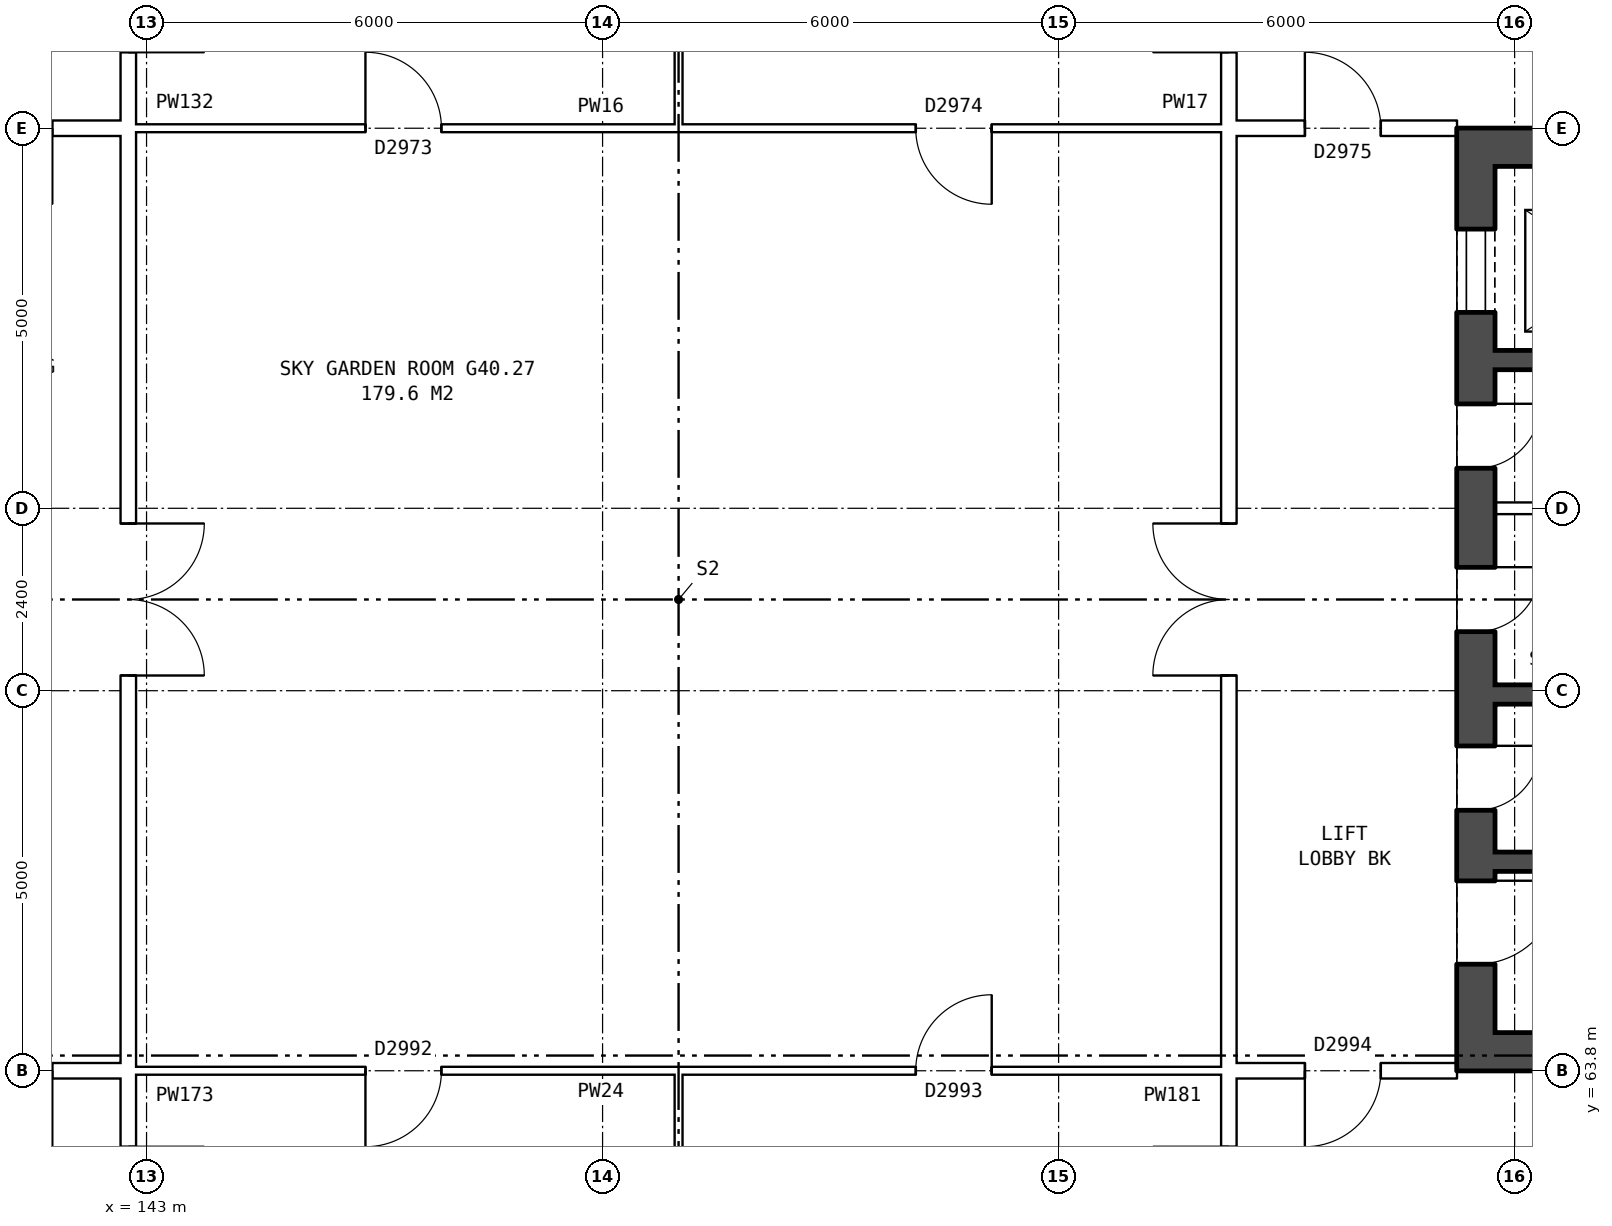
"""IFC4 building model, lengths in metres.
Left out: names, types, materials, properties, quantities, classifications, styles, units other than length and angle.
Written with IfcOpenShell. Run it as: python <this file> out.ifc"""

import sys

from ifc_helpers import new_model, si_unit, direction, frame, frame_2d, origin, place, context, subcontext, project, spatial, rectangle, extrude, element, fill, save


model = new_model("IFC4")
c1 = context("Model", 3, precision=1e-05, world=origin(), true_north=direction((0.0, 1.0)))
c2 = subcontext(c1, "Body", "Model", "MODEL_VIEW")
j1 = project(units=[si_unit("LENGTHUNIT", "METRE"), si_unit("PLANEANGLEUNIT", "RADIAN")], contexts=[c1])
p1 = place(None, origin())
s1 = spatial("IfcSite", under=j1, at=p1, CompositionType="ELEMENT")
p2 = place(p1, origin())
s2 = spatial("IfcBuilding", under=s1, at=p2, CompositionType="ELEMENT")
p3 = place(p2, frame((0.0, 0.0, 142.3)))
s3 = spatial("IfcBuildingStorey", under=s2, at=p3, CompositionType="ELEMENT", Elevation=142.3)
p4 = place(p3, frame((142.76, 63.9, 0.0), z_axis=(0.0, 0.0, 1.0), x_axis=(0.0, 1.0, 0.0)))
e1 = element("IfcWall", 1, at=p4, inside=s3, PredefinedType="PARTITIONING", context=c2, shape_type="SweptSolid", body=[
    extrude(rectangle(XDim=12.2, YDim=0.2, at=frame_2d((6.1, 0.0))), origin(), (0.0, 0.0, 1.0), 5.6),
])
p5 = place(p4, frame((5.1, 0.0, 0.0)))
e2 = element("IfcOpeningElement", 2, at=p5, cuts=e1, PredefinedType="OPENING", context=c2, shape_type="SweptSolid", body=[
    extrude(rectangle(XDim=2.0, YDim=2.1, at=frame_2d((1.0, 1.05))), frame((0.0, 0.11, 0.0), z_axis=(0.0, -1.0, 0.0), x_axis=(1.0, 0.0, 0.0)), (0.0, 0.0, 1.0), 0.22),
])
p6 = place(p3, frame((160.49, 76.2, 0.0), z_axis=(0.0, 0.0, 1.0), x_axis=(0.0, -1.0, 0.0)))
e3 = element("IfcWall", 3, at=p6, inside=s3, PredefinedType="SHEAR", context=c2, shape_type="SweptSolid", body=[
    extrude(rectangle(XDim=12.4, YDim=0.5, at=frame_2d((6.2, 0.0))), origin(), (0.0, 0.0, 1.0), 5.6),
])
p7 = place(p6, frame((1.325, 0.0, 0.0)))
e4 = element("IfcOpeningElement", 4, at=p7, cuts=e3, PredefinedType="OPENING", context=c2, shape_type="SweptSolid", body=[
    extrude(rectangle(XDim=1.1, YDim=2.1, at=frame_2d((0.55, 1.05))), frame((0.0, 0.26, 0.0), z_axis=(0.0, -1.0, 0.0), x_axis=(1.0, 0.0, 0.0)), (0.0, 0.0, 1.0), 0.52),
])
p8 = place(p6, frame((3.625, 0.0, 0.0)))
e5 = element("IfcOpeningElement", 5, at=p8, cuts=e3, PredefinedType="OPENING", context=c2, shape_type="SweptSolid", body=[
    extrude(rectangle(XDim=0.85, YDim=2.1, at=frame_2d((0.425, 1.05))), frame((0.0, 0.26, 0.0), z_axis=(0.0, -1.0, 0.0), x_axis=(1.0, 0.0, 0.0)), (0.0, 0.0, 1.0), 0.52),
])
p9 = place(p6, frame((5.775, 0.0, 0.0)))
e6 = element("IfcOpeningElement", 6, at=p9, cuts=e3, PredefinedType="OPENING", context=c2, shape_type="SweptSolid", body=[
    extrude(rectangle(XDim=0.85, YDim=2.1, at=frame_2d((0.425, 1.05))), frame((0.0, 0.26, 0.0), z_axis=(0.0, -1.0, 0.0), x_axis=(1.0, 0.0, 0.0)), (0.0, 0.0, 1.0), 0.52),
])
p10 = place(p6, frame((9.9, 0.0, 0.0)))
e7 = element("IfcOpeningElement", 7, at=p10, cuts=e3, PredefinedType="OPENING", context=c2, shape_type="SweptSolid", body=[
    extrude(rectangle(XDim=1.1, YDim=2.1, at=frame_2d((0.55, 1.05))), frame((0.0, 0.26, 0.0), z_axis=(0.0, -1.0, 0.0), x_axis=(1.0, 0.0, 0.0)), (0.0, 0.0, 1.0), 0.52),
])
p11 = place(p6, frame((8.125, 0.0, 0.0)))
e8 = element("IfcOpeningElement", 8, at=p11, cuts=e3, PredefinedType="OPENING", context=c2, shape_type="SweptSolid", body=[
    extrude(rectangle(XDim=0.85, YDim=2.1, at=frame_2d((0.425, 1.05))), frame((0.0, 0.26, 0.0), z_axis=(0.0, -1.0, 0.0), x_axis=(1.0, 0.0, 0.0)), (0.0, 0.0, 1.0), 0.52),
])
for number, where, z_axis, x_axis in (
    (9, (160.74, 75.95, 0.0), (0.0, 0.0, 1.0), (1.0, 0.0, 0.0)),
    (10, (160.74, 64.05, 0.0), (0.0, 0.0, 1.0), (1.0, 0.0, 0.0)),
):
    element("IfcWall", number, at=place(p3, frame(where, z_axis=z_axis, x_axis=x_axis)), inside=s3, PredefinedType="SHEAR", context=c2, shape_type="SweptSolid", body=[
        extrude(rectangle(XDim=7.4, YDim=0.5, at=frame_2d((3.7, 0.0))), origin(), (0.0, 0.0, 1.0), 5.6),
    ])
p12 = place(p3, frame((160.74, 73.15, 0.0), z_axis=(0.0, 0.0, 1.0), x_axis=(1.0, 0.0, 0.0)))
e11 = element("IfcWall", 11, at=p12, inside=s3, PredefinedType="SHEAR", context=c2, shape_type="SweptSolid", body=[
    extrude(rectangle(XDim=4.575, YDim=0.25, at=frame_2d((2.288, 0.0))), origin(), (0.0, 0.0, 1.0), 5.6),
])
p13 = place(p3, frame((160.74, 71.2, 0.0), z_axis=(0.0, 0.0, 1.0), x_axis=(1.0, 0.0, 0.0)))
e12 = element("IfcWall", 12, at=p13, inside=s3, PredefinedType="PARTITIONING", context=c2, shape_type="SweptSolid", body=[
    extrude(rectangle(XDim=2.425, YDim=0.15, at=frame_2d((1.212, 0.0))), origin(), (0.0, 0.0, 1.0), 5.6),
])
p14 = place(p3, frame((160.74, 68.75, 0.0), z_axis=(0.0, 0.0, 1.0), x_axis=(1.0, 0.0, 0.0)))
e13 = element("IfcWall", 13, at=p14, inside=s3, PredefinedType="SHEAR", context=c2, shape_type="SweptSolid", body=[
    extrude(rectangle(XDim=7.4, YDim=0.25, at=frame_2d((3.7, 0.0))), origin(), (0.0, 0.0, 1.0), 5.6),
])
p15 = place(p14, frame((4.975, 0.0, 0.0)))
e14 = element("IfcOpeningElement", 14, at=p15, cuts=e13, PredefinedType="OPENING", context=c2, shape_type="SweptSolid", body=[
    extrude(rectangle(XDim=1.1, YDim=2.1, at=frame_2d((0.55, 1.05))), frame((0.0, 0.135, 0.0), z_axis=(0.0, -1.0, 0.0), x_axis=(1.0, 0.0, 0.0)), (0.0, 0.0, 1.0), 0.27),
])
p16 = place(p14, frame((3.2, 0.0, 0.0)))
e15 = element("IfcOpeningElement", 15, at=p16, cuts=e13, PredefinedType="OPENING", context=c2, shape_type="SweptSolid", body=[
    extrude(rectangle(XDim=0.85, YDim=2.1, at=frame_2d((0.425, 1.05))), frame((0.0, 0.135, 0.0), z_axis=(0.0, -1.0, 0.0), x_axis=(1.0, 0.0, 0.0)), (0.0, 0.0, 1.0), 0.27),
])
p17 = place(p3, frame((160.74, 66.55, 0.0), z_axis=(0.0, 0.0, 1.0), x_axis=(1.0, 0.0, 0.0)))
e16 = element("IfcWall", 16, at=p17, inside=s3, PredefinedType="SHEAR", context=c2, shape_type="SweptSolid", body=[
    extrude(rectangle(XDim=2.425, YDim=0.25, at=frame_2d((1.212, 0.0))), origin(), (0.0, 0.0, 1.0), 5.6),
])
p18 = place(p3, frame((157.24, 63.9, 0.0), z_axis=(0.0, 0.0, 1.0), x_axis=(0.0, 1.0, 0.0)))
e17 = element("IfcWall", 17, at=p18, inside=s3, PredefinedType="PARTITIONING", context=c2, shape_type="SweptSolid", body=[
    extrude(rectangle(XDim=12.2, YDim=0.2, at=frame_2d((6.1, 0.0))), origin(), (0.0, 0.0, 1.0), 5.6),
])
p19 = place(p18, frame((5.1, 0.0, 0.0)))
e18 = element("IfcOpeningElement", 18, at=p19, cuts=e17, PredefinedType="OPENING", context=c2, shape_type="SweptSolid", body=[
    extrude(rectangle(XDim=2.0, YDim=2.1, at=frame_2d((1.0, 1.05))), frame((0.0, 0.11, 0.0), z_axis=(0.0, -1.0, 0.0), x_axis=(1.0, 0.0, 0.0)), (0.0, 0.0, 1.0), 0.22),
])
p20 = place(p3, frame((139.76, 63.8, 0.0), z_axis=(0.0, 0.0, 1.0), x_axis=(1.0, 0.0, 0.0)))
e19 = element("IfcWall", 19, at=p20, inside=s3, PredefinedType="PARTITIONING", context=c2, shape_type="SweptSolid", body=[
    extrude(rectangle(XDim=3.1, YDim=0.2, at=frame_2d((1.55, 0.0))), origin(), (0.0, 0.0, 1.0), 5.6),
])
p21 = place(p20, frame((1.0, 0.0, 0.0)))
e20 = element("IfcOpeningElement", 20, at=p21, cuts=e19, PredefinedType="OPENING", context=c2, shape_type="SweptSolid", body=[
    extrude(rectangle(XDim=1.0, YDim=2.1, at=frame_2d((0.5, 1.05))), frame((0.0, 0.11, 0.0), z_axis=(0.0, -1.0, 0.0), x_axis=(1.0, 0.0, 0.0)), (0.0, 0.0, 1.0), 0.22),
])
p22 = place(p3, frame((157.14, 63.8, 0.0), z_axis=(0.0, 0.0, 1.0), x_axis=(1.0, 0.0, 0.0)))
e21 = element("IfcWall", 21, at=p22, inside=s3, PredefinedType="PARTITIONING", context=c2, shape_type="SweptSolid", body=[
    extrude(rectangle(XDim=3.1, YDim=0.2, at=frame_2d((1.55, 0.0))), origin(), (0.0, 0.0, 1.0), 5.6),
])
p23 = place(p22, frame((1.1, 0.0, 0.0)))
e22 = element("IfcOpeningElement", 22, at=p23, cuts=e21, PredefinedType="OPENING", context=c2, shape_type="SweptSolid", body=[
    extrude(rectangle(XDim=1.0, YDim=2.1, at=frame_2d((0.5, 1.05))), frame((0.0, 0.11, 0.0), z_axis=(0.0, -1.0, 0.0), x_axis=(1.0, 0.0, 0.0)), (0.0, 0.0, 1.0), 0.22),
])
p24 = place(p3, frame((142.66, 63.8, 0.0), z_axis=(0.0, 0.0, 1.0), x_axis=(1.0, 0.0, 0.0)))
e23 = element("IfcWall", 23, at=p24, inside=s3, PredefinedType="PARTITIONING", context=c2, shape_type="SweptSolid", body=[
    extrude(rectangle(XDim=14.68, YDim=0.1, at=frame_2d((7.34, 0.0))), origin(), (0.0, 0.0, 1.0), 5.6),
])
p25 = place(p24, frame((3.22, 0.0, 0.0)))
e24 = element("IfcOpeningElement", 24, at=p25, cuts=e23, PredefinedType="OPENING", context=c2, shape_type="SweptSolid", body=[
    extrude(rectangle(XDim=1.0, YDim=2.1, at=frame_2d((0.5, 1.05))), frame((0.0, 0.06, 0.0), z_axis=(0.0, -1.0, 0.0), x_axis=(1.0, 0.0, 0.0)), (0.0, 0.0, 1.0), 0.12),
])
p26 = place(p24, frame((10.46, 0.0, 0.0)))
e25 = element("IfcOpeningElement", 25, at=p26, cuts=e23, PredefinedType="OPENING", context=c2, shape_type="SweptSolid", body=[
    extrude(rectangle(XDim=1.0, YDim=2.1, at=frame_2d((0.5, 1.05))), frame((0.0, 0.06, 0.0), z_axis=(0.0, -1.0, 0.0), x_axis=(1.0, 0.0, 0.0)), (0.0, 0.0, 1.0), 0.12),
])
p27 = place(p3, frame((139.76, 76.2, 0.0), z_axis=(0.0, 0.0, 1.0), x_axis=(1.0, 0.0, 0.0)))
e26 = element("IfcWall", 26, at=p27, inside=s3, PredefinedType="PARTITIONING", context=c2, shape_type="SweptSolid", body=[
    extrude(rectangle(XDim=3.1, YDim=0.2, at=frame_2d((1.55, 0.0))), origin(), (0.0, 0.0, 1.0), 5.6),
])
p28 = place(p27, frame((1.0, 0.0, 0.0)))
e27 = element("IfcOpeningElement", 27, at=p28, cuts=e26, PredefinedType="OPENING", context=c2, shape_type="SweptSolid", body=[
    extrude(rectangle(XDim=1.0, YDim=2.1, at=frame_2d((0.5, 1.05))), frame((0.0, 0.11, 0.0), z_axis=(0.0, -1.0, 0.0), x_axis=(1.0, 0.0, 0.0)), (0.0, 0.0, 1.0), 0.22),
])
p29 = place(p3, frame((157.14, 76.2, 0.0), z_axis=(0.0, 0.0, 1.0), x_axis=(1.0, 0.0, 0.0)))
e28 = element("IfcWall", 28, at=p29, inside=s3, PredefinedType="PARTITIONING", context=c2, shape_type="SweptSolid", body=[
    extrude(rectangle(XDim=3.1, YDim=0.2, at=frame_2d((1.55, 0.0))), origin(), (0.0, 0.0, 1.0), 5.6),
])
p30 = place(p29, frame((1.1, 0.0, 0.0)))
e29 = element("IfcOpeningElement", 29, at=p30, cuts=e28, PredefinedType="OPENING", context=c2, shape_type="SweptSolid", body=[
    extrude(rectangle(XDim=1.0, YDim=2.1, at=frame_2d((0.5, 1.05))), frame((0.0, 0.11, 0.0), z_axis=(0.0, -1.0, 0.0), x_axis=(1.0, 0.0, 0.0)), (0.0, 0.0, 1.0), 0.22),
])
p31 = place(p3, frame((142.66, 76.2, 0.0), z_axis=(0.0, 0.0, 1.0), x_axis=(1.0, 0.0, 0.0)))
e30 = element("IfcWall", 30, at=p31, inside=s3, PredefinedType="PARTITIONING", context=c2, shape_type="SweptSolid", body=[
    extrude(rectangle(XDim=14.68, YDim=0.1, at=frame_2d((7.34, 0.0))), origin(), (0.0, 0.0, 1.0), 5.6),
])
p32 = place(p31, frame((3.22, 0.0, 0.0)))
e31 = element("IfcOpeningElement", 31, at=p32, cuts=e30, PredefinedType="OPENING", context=c2, shape_type="SweptSolid", body=[
    extrude(rectangle(XDim=1.0, YDim=2.1, at=frame_2d((0.5, 1.05))), frame((0.0, 0.06, 0.0), z_axis=(0.0, -1.0, 0.0), x_axis=(1.0, 0.0, 0.0)), (0.0, 0.0, 1.0), 0.12),
])
p33 = place(p31, frame((10.46, 0.0, 0.0)))
e32 = element("IfcOpeningElement", 32, at=p33, cuts=e30, PredefinedType="OPENING", context=c2, shape_type="SweptSolid", body=[
    extrude(rectangle(XDim=1.0, YDim=2.1, at=frame_2d((0.5, 1.05))), frame((0.0, 0.06, 0.0), z_axis=(0.0, -1.0, 0.0), x_axis=(1.0, 0.0, 0.0)), (0.0, 0.0, 1.0), 0.12),
])
p34 = place(p3, frame((142.76, 60.7, 0.0), z_axis=(0.0, 0.0, 1.0), x_axis=(0.0, 1.0, 0.0)))
e33 = element("IfcWall", 33, at=p34, inside=s3, PredefinedType="PARTITIONING", context=c2, shape_type="SweptSolid", body=[
    extrude(rectangle(XDim=3.2, YDim=0.2, at=frame_2d((1.6, 0.0))), origin(), (0.0, 0.0, 1.0), 5.6),
])
p35 = place(p34, frame((1.1, 0.0, 0.0)))
e34 = element("IfcOpeningElement", 34, at=p35, cuts=e33, PredefinedType="OPENING", context=c2, shape_type="SweptSolid", body=[
    extrude(rectangle(XDim=1.0, YDim=2.1, at=frame_2d((0.5, 1.05))), frame((0.0, 0.11, 0.0), z_axis=(0.0, -1.0, 0.0), x_axis=(1.0, 0.0, 0.0)), (0.0, 0.0, 1.0), 0.22),
])
p36 = place(p3, frame((142.76, 76.1, 0.0), z_axis=(0.0, 0.0, 1.0), x_axis=(0.0, 1.0, 0.0)))
e35 = element("IfcWall", 35, at=p36, inside=s3, PredefinedType="PARTITIONING", context=c2, shape_type="SweptSolid", body=[
    extrude(rectangle(XDim=3.2, YDim=0.2, at=frame_2d((1.6, 0.0))), origin(), (0.0, 0.0, 1.0), 5.6),
])
p37 = place(p36, frame((1.1, 0.0, 0.0)))
e36 = element("IfcOpeningElement", 36, at=p37, cuts=e35, PredefinedType="OPENING", context=c2, shape_type="SweptSolid", body=[
    extrude(rectangle(XDim=1.0, YDim=2.1, at=frame_2d((0.5, 1.05))), frame((0.0, 0.11, 0.0), z_axis=(0.0, -1.0, 0.0), x_axis=(1.0, 0.0, 0.0)), (0.0, 0.0, 1.0), 0.22),
])
for number, where, z_axis, x_axis in (
    (37, (150.0, 60.75, 0.0), (0.0, 0.0, 1.0), (0.0, 1.0, 0.0)),
    (38, (150.0, 76.15, 0.0), (0.0, 0.0, 1.0), (0.0, 1.0, 0.0)),
):
    element("IfcWall", number, at=place(p3, frame(where, z_axis=z_axis, x_axis=x_axis)), inside=s3, PredefinedType="PARTITIONING", context=c2, shape_type="SweptSolid", body=[
        extrude(rectangle(XDim=3.1, YDim=0.1, at=frame_2d((1.55, 0.0))), origin(), (0.0, 0.0, 1.0), 5.6),
    ])
p38 = place(p3, frame((157.24, 60.7, 0.0), z_axis=(0.0, 0.0, 1.0), x_axis=(0.0, 1.0, 0.0)))
e39 = element("IfcWall", 39, at=p38, inside=s3, PredefinedType="PARTITIONING", context=c2, shape_type="SweptSolid", body=[
    extrude(rectangle(XDim=3.2, YDim=0.2, at=frame_2d((1.6, 0.0))), origin(), (0.0, 0.0, 1.0), 5.6),
])
p39 = place(p38, frame((1.1, 0.0, 0.0)))
e40 = element("IfcOpeningElement", 40, at=p39, cuts=e39, PredefinedType="OPENING", context=c2, shape_type="SweptSolid", body=[
    extrude(rectangle(XDim=1.0, YDim=2.1, at=frame_2d((0.5, 1.05))), frame((0.0, 0.11, 0.0), z_axis=(0.0, -1.0, 0.0), x_axis=(1.0, 0.0, 0.0)), (0.0, 0.0, 1.0), 0.22),
])
p40 = place(p3, frame((157.24, 76.1, 0.0), z_axis=(0.0, 0.0, 1.0), x_axis=(0.0, 1.0, 0.0)))
e41 = element("IfcWall", 41, at=p40, inside=s3, PredefinedType="PARTITIONING", context=c2, shape_type="SweptSolid", body=[
    extrude(rectangle(XDim=3.2, YDim=0.2, at=frame_2d((1.6, 0.0))), origin(), (0.0, 0.0, 1.0), 5.6),
])
p41 = place(p40, frame((1.1, 0.0, 0.0)))
e42 = element("IfcOpeningElement", 42, at=p41, cuts=e41, PredefinedType="OPENING", context=c2, shape_type="SweptSolid", body=[
    extrude(rectangle(XDim=1.0, YDim=2.1, at=frame_2d((0.5, 1.05))), frame((0.0, 0.11, 0.0), z_axis=(0.0, -1.0, 0.0), x_axis=(1.0, 0.0, 0.0)), (0.0, 0.0, 1.0), 0.22),
])
p42 = place(p5, frame((2.0, 0.0, 0.0), z_axis=(0.0, 0.0, 1.0), x_axis=(-1.0, 0.0, 0.0)))
e43 = element("IfcDoor", 43, at=p42, inside=s3, OperationType="DOUBLE_DOOR_SINGLE_SWING", PredefinedType="DOOR", context=c2, shape_type="SweptSolid", body=[
    extrude(rectangle(XDim=2.0, YDim=2.1, at=frame_2d((1.0, 1.05))), frame((0.0, 0.025, 0.0), z_axis=(0.0, -1.0, 0.0), x_axis=(1.0, 0.0, 0.0)), (0.0, 0.0, 1.0), 0.05),
])
fill(e2, e43)
p43 = place(p7, origin())
e44 = element("IfcDoor", 44, at=p43, inside=s3, OperationType="DOUBLE_DOOR_SLIDING", PredefinedType="DOOR", context=c2, shape_type="SweptSolid", body=[
    extrude(rectangle(XDim=1.1, YDim=2.1, at=frame_2d((0.55, 1.05))), frame((0.0, 0.235, 0.0), z_axis=(0.0, -1.0, 0.0), x_axis=(1.0, 0.0, 0.0)), (0.0, 0.0, 1.0), 0.05),
])
fill(e4, e44)
p44 = place(p8, origin())
e45 = element("IfcDoor", 45, at=p44, inside=s3, OperationType="SINGLE_SWING_LEFT", PredefinedType="DOOR", context=c2, shape_type="SweptSolid", body=[
    extrude(rectangle(XDim=0.85, YDim=2.1, at=frame_2d((0.425, 1.05))), frame((0.0, 0.235, 0.0), z_axis=(0.0, -1.0, 0.0), x_axis=(1.0, 0.0, 0.0)), (0.0, 0.0, 1.0), 0.05),
])
fill(e5, e45)
p45 = place(p9, origin())
e46 = element("IfcDoor", 46, at=p45, inside=s3, OperationType="SINGLE_SWING_LEFT", PredefinedType="DOOR", context=c2, shape_type="SweptSolid", body=[
    extrude(rectangle(XDim=0.85, YDim=2.1, at=frame_2d((0.425, 1.05))), frame((0.0, 0.235, 0.0), z_axis=(0.0, -1.0, 0.0), x_axis=(1.0, 0.0, 0.0)), (0.0, 0.0, 1.0), 0.05),
])
fill(e6, e46)
p46 = place(p10, origin())
e47 = element("IfcDoor", 47, at=p46, inside=s3, OperationType="SINGLE_SWING_LEFT", PredefinedType="DOOR", context=c2, shape_type="SweptSolid", body=[
    extrude(rectangle(XDim=1.1, YDim=2.1, at=frame_2d((0.55, 1.05))), frame((0.0, 0.235, 0.0), z_axis=(0.0, -1.0, 0.0), x_axis=(1.0, 0.0, 0.0)), (0.0, 0.0, 1.0), 0.05),
])
fill(e7, e47)
p47 = place(p11, origin())
e48 = element("IfcDoor", 48, at=p47, inside=s3, OperationType="SINGLE_SWING_LEFT", PredefinedType="DOOR", context=c2, shape_type="SweptSolid", body=[
    extrude(rectangle(XDim=0.85, YDim=2.1, at=frame_2d((0.425, 1.05))), frame((0.0, 0.235, 0.0), z_axis=(0.0, -1.0, 0.0), x_axis=(1.0, 0.0, 0.0)), (0.0, 0.0, 1.0), 0.05),
])
fill(e8, e48)
p48 = place(p19, origin())
e49 = element("IfcDoor", 49, at=p48, inside=s3, OperationType="DOUBLE_DOOR_SINGLE_SWING", PredefinedType="DOOR", context=c2, shape_type="SweptSolid", body=[
    extrude(rectangle(XDim=2.0, YDim=2.1, at=frame_2d((1.0, 1.05))), frame((0.0, 0.025, 0.0), z_axis=(0.0, -1.0, 0.0), x_axis=(1.0, 0.0, 0.0)), (0.0, 0.0, 1.0), 0.05),
])
fill(e18, e49)
p49 = place(p23, frame((1.0, 0.0, 0.0), z_axis=(0.0, 0.0, 1.0), x_axis=(-1.0, 0.0, 0.0)))
e50 = element("IfcDoor", 50, at=p49, inside=s3, OperationType="SINGLE_SWING_RIGHT", PredefinedType="DOOR", context=c2, shape_type="SweptSolid", body=[
    extrude(rectangle(XDim=1.0, YDim=2.1, at=frame_2d((0.5, 1.05))), frame((0.0, 0.025, 0.0), z_axis=(0.0, -1.0, 0.0), x_axis=(1.0, 0.0, 0.0)), (0.0, 0.0, 1.0), 0.05),
])
fill(e22, e50)
p50 = place(p25, frame((1.0, 0.0, 0.0), z_axis=(0.0, 0.0, 1.0), x_axis=(-1.0, 0.0, 0.0)))
e51 = element("IfcDoor", 51, at=p50, inside=s3, OperationType="SINGLE_SWING_RIGHT", PredefinedType="DOOR", context=c2, shape_type="SweptSolid", body=[
    extrude(rectangle(XDim=1.0, YDim=2.1, at=frame_2d((0.5, 1.05))), frame((0.0, 0.025, 0.0), z_axis=(0.0, -1.0, 0.0), x_axis=(1.0, 0.0, 0.0)), (0.0, 0.0, 1.0), 0.05),
])
fill(e24, e51)
p51 = place(p26, origin())
e52 = element("IfcDoor", 52, at=p51, inside=s3, OperationType="SINGLE_SWING_RIGHT", PredefinedType="DOOR", context=c2, shape_type="SweptSolid", body=[
    extrude(rectangle(XDim=1.0, YDim=2.1, at=frame_2d((0.5, 1.05))), frame((0.0, 0.025, 0.0), z_axis=(0.0, -1.0, 0.0), x_axis=(1.0, 0.0, 0.0)), (0.0, 0.0, 1.0), 0.05),
])
fill(e25, e52)
p52 = place(p30, origin())
e53 = element("IfcDoor", 53, at=p52, inside=s3, OperationType="SINGLE_SWING_LEFT", PredefinedType="DOOR", context=c2, shape_type="SweptSolid", body=[
    extrude(rectangle(XDim=1.0, YDim=2.1, at=frame_2d((0.5, 1.05))), frame((0.0, 0.025, 0.0), z_axis=(0.0, -1.0, 0.0), x_axis=(1.0, 0.0, 0.0)), (0.0, 0.0, 1.0), 0.05),
])
fill(e29, e53)
p53 = place(p32, origin())
e54 = element("IfcDoor", 54, at=p53, inside=s3, OperationType="SINGLE_SWING_LEFT", PredefinedType="DOOR", context=c2, shape_type="SweptSolid", body=[
    extrude(rectangle(XDim=1.0, YDim=2.1, at=frame_2d((0.5, 1.05))), frame((0.0, 0.025, 0.0), z_axis=(0.0, -1.0, 0.0), x_axis=(1.0, 0.0, 0.0)), (0.0, 0.0, 1.0), 0.05),
])
fill(e31, e54)
p54 = place(p33, frame((1.0, 0.0, 0.0), z_axis=(0.0, 0.0, 1.0), x_axis=(-1.0, 0.0, 0.0)))
e55 = element("IfcDoor", 55, at=p54, inside=s3, OperationType="SINGLE_SWING_LEFT", PredefinedType="DOOR", context=c2, shape_type="SweptSolid", body=[
    extrude(rectangle(XDim=1.0, YDim=2.1, at=frame_2d((0.5, 1.05))), frame((0.0, 0.025, 0.0), z_axis=(0.0, -1.0, 0.0), x_axis=(1.0, 0.0, 0.0)), (0.0, 0.0, 1.0), 0.05),
])
fill(e32, e55)
save(model, sys.argv[1])
